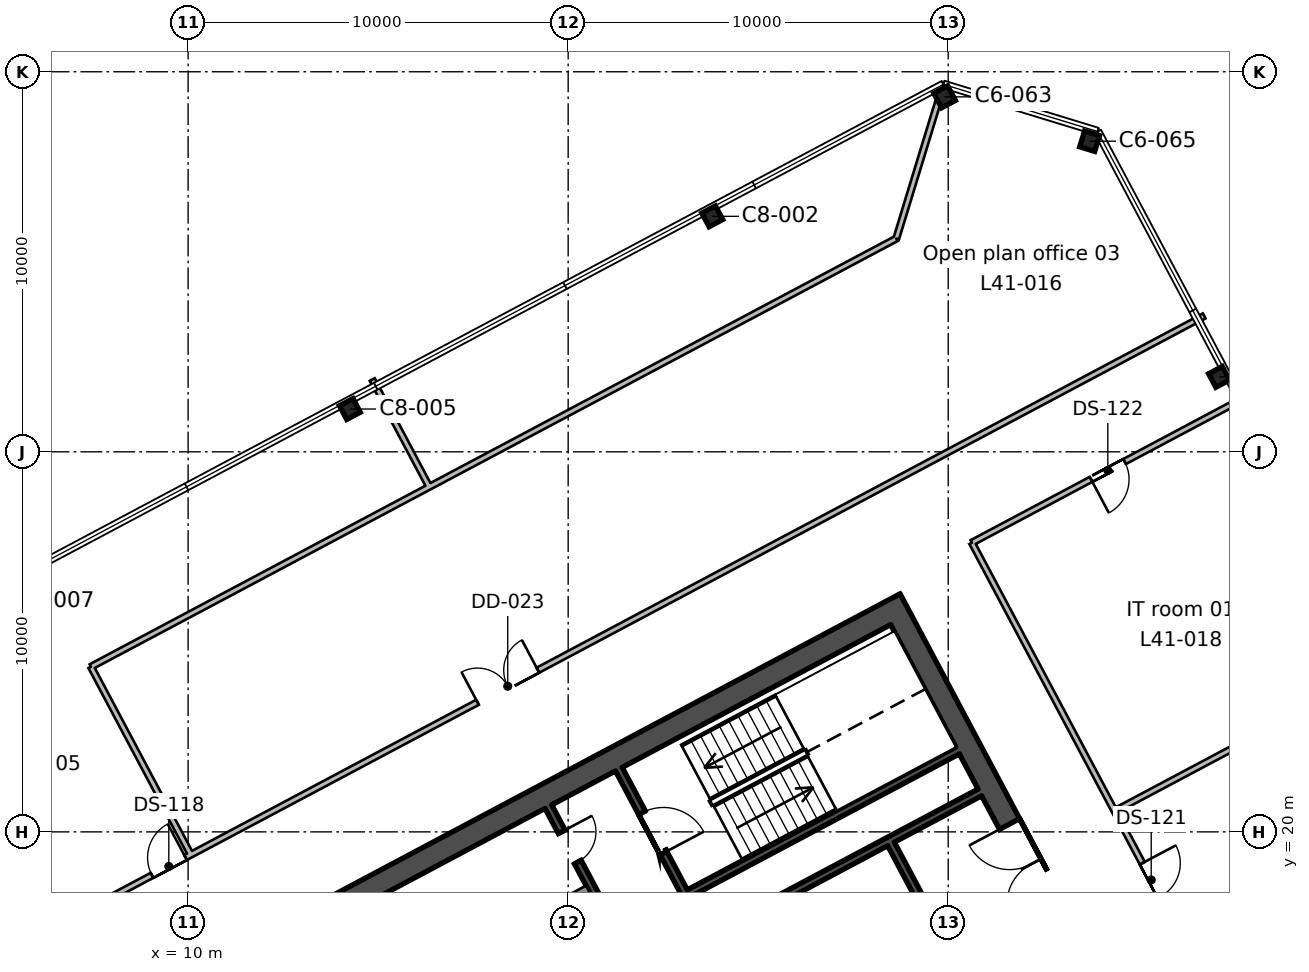
"""IFC4 building model, lengths in metres.
Left out: names, types, materials, properties, quantities, classifications, styles, units other than length and angle.
Written with IfcOpenShell. Run it as: python <this file> out.ifc"""

import sys

from ifc_helpers import new_model, si_unit, direction, frame, frame_2d, origin, origin_2d, place, context, subcontext, project, spatial, rectangle, i_section, extrude, element, fill, save


model = new_model("IFC4")
c1 = context("Model", 3, precision=1e-05, world=origin(), true_north=direction((0.0, 1.0)))
c2 = subcontext(c1, "Body", "Model", "MODEL_VIEW")
j1 = project(units=[si_unit("LENGTHUNIT", "METRE"), si_unit("PLANEANGLEUNIT", "RADIAN")], contexts=[c1])
p1 = place(None, origin())
s1 = spatial("IfcSite", under=j1, at=p1, CompositionType="ELEMENT")
p2 = place(p1, origin())
s2 = spatial("IfcBuilding", under=s1, at=p2, CompositionType="ELEMENT")
p3 = place(p2, frame((0.0, 0.0, 193.5)))
s3 = spatial("IfcBuildingStorey", under=s2, at=p3, CompositionType="ELEMENT", Elevation=193.5)
for number, where, z_axis, x_axis in (
    (1, (14.256, 31.126, 0.0), (0.0, 0.0, 1.0), (-0.883, -0.469, 0.0)),
    (2, (37.126, 31.972, 0.0), (0.0, 0.0, 1.0), (-0.469, 0.883, 0.0)),
    (3, (23.792, 36.196, 0.0), (0.0, 0.0, 1.0), (-0.883, -0.469, 0.0)),
):
    element("IfcColumn", number, at=place(p3, frame(where, z_axis=z_axis, x_axis=x_axis)), inside=s3, PredefinedType="COLUMN", context=c2, shape_type="SweptSolid", body=[
        extrude(i_section(OverallWidth=0.404, OverallDepth=0.406, WebThickness=0.027, FlangeThickness=0.044, FilletRadius=0.015, at=origin_2d()), origin(), (0.0, 0.0, 1.0), 3.9),
    ])
for number, where, z_axis, x_axis in (
    (4, (33.721, 38.173, 0.0), (0.0, 0.0, 1.0), (-0.956, 0.292, 0.0)),
    (5, (29.905, 39.34, 0.0), (0.0, 0.0, 1.0), (-0.883, -0.469, 0.0)),
):
    element("IfcColumn", number, at=place(p3, frame(where, z_axis=z_axis, x_axis=x_axis)), inside=s3, PredefinedType="COLUMN", context=c2, shape_type="SweptSolid", body=[
        extrude(i_section(OverallWidth=0.412, OverallDepth=0.434, WebThickness=0.036, FlangeThickness=0.057, FilletRadius=0.015, at=origin_2d()), origin(), (0.0, 0.0, 1.0), 3.9),
    ])
p4 = place(p3, frame((37.576, 8.994, 0.0), z_axis=(0.0, 0.0, 1.0), x_axis=(-0.469478769487, 0.88294376095, 0.0)))
e6 = element("IfcWall", 6, at=p4, inside=s3, PredefinedType="SHEAR", context=c2, shape_type="SweptSolid", body=[
    extrude(rectangle(XDim=19.4, YDim=0.6, at=frame_2d((9.7, 0.0))), origin(), (0.0, 0.0, 1.0), 3.9),
])
p5 = place(p4, frame((10.3, 0.0, 0.0)))
e7 = element("IfcOpeningElement", 7, at=p5, cuts=e6, PredefinedType="OPENING", context=c2, shape_type="SweptSolid", body=[
    extrude(rectangle(XDim=2.4, YDim=2.4, at=frame_2d((1.2, 1.2))), frame((0.0, 0.31, 0.0), z_axis=(0.0, -1.0, 0.0), x_axis=(1.0, 0.0, 0.0)), (0.0, 0.0, 1.0), 0.62),
])
p6 = place(p3, frame((10.509, 16.234, 0.0), z_axis=(0.0, 0.0, 1.0), x_axis=(0.88295010195, 0.469466843842, 0.0)))
e8 = element("IfcWall", 8, at=p6, inside=s3, PredefinedType="SHEAR", context=c2, shape_type="SweptSolid", body=[
    extrude(rectangle(XDim=20.2, YDim=0.6, at=frame_2d((10.1, 0.0))), origin(), (0.0, 0.0, 1.0), 3.9),
])
p7 = place(p3, frame((22.906, 14.218, 0.0), z_axis=(0.0, 0.0, 1.0), x_axis=(-0.469480409012, 0.88294288918, 0.0)))
e9 = element("IfcWall", 9, at=p7, inside=s3, PredefinedType="SHEAR", context=c2, shape_type="SweptSolid", body=[
    extrude(rectangle(XDim=7.3, YDim=0.2, at=frame_2d((3.65, 0.0))), origin(), (0.0, 0.0, 1.0), 3.9),
])
p8 = place(p7, frame((3.15, 0.0, 0.0)))
e10 = element("IfcOpeningElement", 10, at=p8, cuts=e9, PredefinedType="OPENING", context=c2, shape_type="SweptSolid", body=[
    extrude(rectangle(XDim=0.9, YDim=2.1, at=frame_2d((0.45, 1.05))), frame((0.0, 0.11, 0.0), z_axis=(0.0, -1.0, 0.0), x_axis=(1.0, 0.0, 0.0)), (0.0, 0.0, 1.0), 0.22),
])
p9 = place(p7, frame((5.65, 0.0, 0.0)))
e11 = element("IfcOpeningElement", 11, at=p9, cuts=e9, PredefinedType="OPENING", context=c2, shape_type="SweptSolid", body=[
    extrude(rectangle(XDim=0.9, YDim=2.1, at=frame_2d((0.45, 1.05))), frame((0.0, 0.11, 0.0), z_axis=(0.0, -1.0, 0.0), x_axis=(1.0, 0.0, 0.0)), (0.0, 0.0, 1.0), 0.22),
])
p10 = place(p3, frame((24.76, 15.204, 0.0), z_axis=(0.0, 0.0, 1.0), x_axis=(-0.469494272526, 0.882935517501, 0.0)))
e12 = element("IfcWall", 12, at=p10, inside=s3, PredefinedType="SHEAR", context=c2, shape_type="SweptSolid", body=[
    extrude(rectangle(XDim=7.3, YDim=0.2, at=frame_2d((3.65, 0.0))), origin(), (0.0, 0.0, 1.0), 3.9),
])
p11 = place(p10, frame((4.8, 0.0, 0.0)))
e13 = element("IfcOpeningElement", 13, at=p11, cuts=e12, PredefinedType="OPENING", context=c2, shape_type="SweptSolid", body=[
    extrude(rectangle(XDim=1.2, YDim=2.1, at=frame_2d((0.6, 1.05))), frame((0.0, 0.11, 0.0), z_axis=(0.0, -1.0, 0.0), x_axis=(1.0, 0.0, 0.0)), (0.0, 0.0, 1.0), 0.22),
])
p12 = place(p3, frame((29.528, 17.739, 0.0), z_axis=(0.0, 0.0, 1.0), x_axis=(-0.469401318492, 0.882984938828, 0.0)))
e14 = element("IfcWall", 14, at=p12, inside=s3, PredefinedType="SHEAR", context=c2, shape_type="SweptSolid", body=[
    extrude(rectangle(XDim=2.2, YDim=0.2, at=frame_2d((1.1, 0.0))), origin(), (0.0, 0.0, 1.0), 3.9),
])
p13 = place(p3, frame((23.769, 17.282, 0.0), z_axis=(0.0, 0.0, 1.0), x_axis=(0.882940221191, 0.469485426614, 0.0)))
e15 = element("IfcWall", 15, at=p13, inside=s3, PredefinedType="SHEAR", context=c2, shape_type="SweptSolid", body=[
    extrude(rectangle(XDim=8.0, YDim=0.2, at=frame_2d((4.0, 0.0))), origin(), (0.0, 0.0, 1.0), 3.9),
])
p14 = place(p3, frame((23.182, 18.385, 0.0), z_axis=(0.0, 0.0, 1.0), x_axis=(0.88295287151, 0.469461634952, 0.0)))
e16 = element("IfcWall", 16, at=p14, inside=s3, PredefinedType="SHEAR", context=c2, shape_type="SweptSolid", body=[
    extrude(rectangle(XDim=8.0, YDim=0.2, at=frame_2d((4.0, 0.0))), origin(), (0.0, 0.0, 1.0), 3.9),
])
p15 = place(p3, frame((15.926, 16.056, 0.0), z_axis=(0.0, 0.0, 1.0), x_axis=(0.882953967957, 0.469459572775, 0.0)))
e17 = element("IfcWall", 17, at=p15, inside=s3, PredefinedType="SOLIDWALL", context=c2, shape_type="SweptSolid", body=[
    extrude(rectangle(XDim=5.2, YDim=0.2, at=frame_2d((2.6, 0.0))), origin(), (0.0, 0.0, 1.0), 3.9),
])
p16 = place(p3, frame((0.0, 14.044, 0.0), z_axis=(0.0, 0.0, 1.0), x_axis=(0.882962129795, 0.469444221764, 0.0)))
e18 = element("IfcWall", 18, at=p16, inside=s3, PredefinedType="PARTITIONING", context=c2, shape_type="SweptSolid", body=[
    extrude(rectangle(XDim=41.607, YDim=0.15, at=frame_2d((20.803, 0.0))), origin(), (0.0, 0.0, 1.0), 3.54),
])
p17 = place(p16, frame((19.95, 0.0, 0.0)))
e19 = element("IfcOpeningElement", 19, at=p17, cuts=e18, PredefinedType="OPENING", context=c2, shape_type="SweptSolid", body=[
    extrude(rectangle(XDim=1.8, YDim=2.1, at=frame_2d((0.9, 1.05))), frame((0.0, 0.085, 0.0), z_axis=(0.0, -1.0, 0.0), x_axis=(1.0, 0.0, 0.0)), (0.0, 0.0, 1.0), 0.17),
])
p18 = place(p16, frame((10.25, 0.0, 0.0)))
e20 = element("IfcOpeningElement", 20, at=p18, cuts=e18, PredefinedType="OPENING", context=c2, shape_type="SweptSolid", body=[
    extrude(rectangle(XDim=1.0, YDim=2.1, at=frame_2d((0.5, 1.05))), frame((0.0, 0.085, 0.0), z_axis=(0.0, -1.0, 0.0), x_axis=(1.0, 0.0, 0.0)), (0.0, 0.0, 1.0), 0.17),
])
p19 = place(p3, frame((7.443, 24.344, 0.0), z_axis=(0.0, 0.0, 1.0), x_axis=(0.46934602066, -0.883014333344, 0.0)))
e21 = element("IfcWall", 21, at=p19, inside=s3, PredefinedType="PARTITIONING", context=c2, shape_type="SweptSolid", body=[
    extrude(rectangle(XDim=5.582, YDim=0.15, at=frame_2d((2.791, 0.0))), origin(), (0.0, 0.0, 1.0), 3.54),
])
p20 = place(p3, frame((7.443, 24.343, 0.0), z_axis=(0.0, 0.0, 1.0), x_axis=(0.882919378886, 0.469524621705, 0.0)))
e22 = element("IfcWall", 22, at=p20, inside=s3, PredefinedType="PARTITIONING", context=c2, shape_type="SweptSolid", body=[
    extrude(rectangle(XDim=10.082, YDim=0.15, at=frame_2d((5.041, 0.0))), origin(), (0.0, 0.0, 1.0), 3.54),
])
p21 = place(p3, frame((14.844, 31.903, 0.0), z_axis=(0.0, 0.0, 1.0), x_axis=(0.469051096607, -0.883171030306, 0.0)))
e23 = element("IfcWall", 23, at=p21, inside=s3, PredefinedType="PARTITIONING", context=c2, shape_type="SweptSolid", body=[
    extrude(rectangle(XDim=3.2, YDim=0.15, at=frame_2d((1.6, 0.0))), origin(), (0.0, 0.0, 1.0), 3.54),
])
p22 = place(p3, frame((16.345, 29.077, 0.0), z_axis=(0.0, 0.0, 1.0), x_axis=(0.882962129602, 0.469444222128, 0.0)))
e24 = element("IfcWall", 24, at=p22, inside=s3, PredefinedType="PARTITIONING", context=c2, shape_type="SweptSolid", body=[
    extrude(rectangle(XDim=13.917, YDim=0.15, at=frame_2d((6.958, 0.0))), origin(), (0.0, 0.0, 1.0), 3.54),
])
p23 = place(p3, frame((28.633, 35.61, 0.0), z_axis=(0.0, 0.0, 1.0), x_axis=(0.292294142097, 0.956328465798, 0.0)))
e25 = element("IfcWall", 25, at=p23, inside=s3, PredefinedType="PARTITIONING", context=c2, shape_type="SweptSolid", body=[
    extrude(rectangle(XDim=3.774, YDim=0.15, at=frame_2d((1.887, 0.0))), origin(), (0.0, 0.0, 1.0), 3.54),
])
p24 = place(p3, frame((37.864, 31.458, 0.0), z_axis=(0.0, 0.0, 1.0), x_axis=(-0.882947223068, -0.469472258261, 0.0)))
e26 = element("IfcWall", 26, at=p24, inside=s3, PredefinedType="PARTITIONING", context=c2, shape_type="SweptSolid", body=[
    extrude(rectangle(XDim=8.201, YDim=0.15, at=frame_2d((4.101, 0.0))), origin(), (0.0, 0.0, 1.0), 3.54),
])
p25 = place(p24, frame((3.65, 0.0, 0.0)))
e27 = element("IfcOpeningElement", 27, at=p25, cuts=e26, PredefinedType="OPENING", context=c2, shape_type="SweptSolid", body=[
    extrude(rectangle(XDim=1.0, YDim=2.1, at=frame_2d((0.5, 1.05))), frame((0.0, 0.085, 0.0), z_axis=(0.0, -1.0, 0.0), x_axis=(1.0, 0.0, 0.0)), (0.0, 0.0, 1.0), 0.17),
])
p26 = place(p3, frame((30.623, 27.608, 0.0), z_axis=(0.0, 0.0, 1.0), x_axis=(0.469489882812, -0.882937851685, 0.0)))
e28 = element("IfcWall", 28, at=p26, inside=s3, PredefinedType="PARTITIONING", context=c2, shape_type="SweptSolid", body=[
    extrude(rectangle(XDim=20.0, YDim=0.15, at=frame_2d((10.0, 0.0))), origin(), (0.0, 0.0, 1.0), 3.54),
])
p27 = place(p26, frame((9.55, 0.0, 0.0)))
e29 = element("IfcOpeningElement", 29, at=p27, cuts=e28, PredefinedType="OPENING", context=c2, shape_type="SweptSolid", body=[
    extrude(rectangle(XDim=1.0, YDim=2.1, at=frame_2d((0.5, 1.05))), frame((0.0, 0.085, 0.0), z_axis=(0.0, -1.0, 0.0), x_axis=(1.0, 0.0, 0.0)), (0.0, 0.0, 1.0), 0.17),
])
p28 = place(p3, frame((41.619, 24.395, 0.0), z_axis=(0.0, 0.0, 1.0), x_axis=(-0.882920973231, -0.4695216236, 0.0)))
e30 = element("IfcWall", 30, at=p28, inside=s3, PredefinedType="PARTITIONING", context=c2, shape_type="SweptSolid", body=[
    extrude(rectangle(XDim=8.2, YDim=0.15, at=frame_2d((4.1, 0.0))), origin(), (0.0, 0.0, 1.0), 3.54),
])
p29 = place(p5, origin())
e31 = element("IfcDoor", 31, at=p29, inside=s3, OperationType="DOUBLE_DOOR_SINGLE_SWING", PredefinedType="DOOR", context=c2, shape_type="SweptSolid", body=[
    extrude(rectangle(XDim=2.4, YDim=2.4, at=frame_2d((1.2, 1.2))), frame((0.0, 0.025, 0.0), z_axis=(0.0, -1.0, 0.0), x_axis=(1.0, 0.0, 0.0)), (0.0, 0.0, 1.0), 0.05),
])
fill(e7, e31)
p30 = place(p11, frame((1.2, 0.0, 0.0), z_axis=(0.0, 0.0, 1.0), x_axis=(-1.0, 0.0, 0.0)))
e32 = element("IfcDoor", 32, at=p30, inside=s3, OperationType="SINGLE_SWING_RIGHT", PredefinedType="DOOR", context=c2, shape_type="SweptSolid", body=[
    extrude(rectangle(XDim=1.2, YDim=2.1, at=frame_2d((0.6, 1.05))), frame((0.0, 0.025, 0.0), z_axis=(0.0, -1.0, 0.0), x_axis=(1.0, 0.0, 0.0)), (0.0, 0.0, 1.0), 0.05),
])
fill(e13, e32)
p31 = place(p9, frame((0.9, 0.0, 0.0), z_axis=(0.0, 0.0, 1.0), x_axis=(-1.0, 0.0, 0.0)))
e33 = element("IfcDoor", 33, at=p31, inside=s3, OperationType="SINGLE_SWING_LEFT", PredefinedType="DOOR", context=c2, shape_type="SweptSolid", body=[
    extrude(rectangle(XDim=0.9, YDim=2.1, at=frame_2d((0.45, 1.05))), frame((0.0, 0.025, 0.0), z_axis=(0.0, -1.0, 0.0), x_axis=(1.0, 0.0, 0.0)), (0.0, 0.0, 1.0), 0.05),
])
fill(e11, e33)
p32 = place(p17, origin())
e34 = element("IfcDoor", 34, at=p32, inside=s3, OperationType="DOUBLE_DOOR_SINGLE_SWING", PredefinedType="DOOR", context=c2, shape_type="SweptSolid", body=[
    extrude(rectangle(XDim=1.8, YDim=2.1, at=frame_2d((0.9, 1.05))), frame((0.0, 0.025, 0.0), z_axis=(0.0, -1.0, 0.0), x_axis=(1.0, 0.0, 0.0)), (0.0, 0.0, 1.0), 0.05),
])
fill(e19, e34)
p33 = place(p18, origin())
e35 = element("IfcDoor", 35, at=p33, inside=s3, OperationType="SINGLE_SWING_RIGHT", PredefinedType="DOOR", context=c2, shape_type="SweptSolid", body=[
    extrude(rectangle(XDim=1.0, YDim=2.1, at=frame_2d((0.5, 1.05))), frame((0.0, 0.025, 0.0), z_axis=(0.0, -1.0, 0.0), x_axis=(1.0, 0.0, 0.0)), (0.0, 0.0, 1.0), 0.05),
])
fill(e20, e35)
p34 = place(p27, origin())
e36 = element("IfcDoor", 36, at=p34, inside=s3, OperationType="SINGLE_SWING_LEFT", PredefinedType="DOOR", context=c2, shape_type="SweptSolid", body=[
    extrude(rectangle(XDim=1.0, YDim=2.1, at=frame_2d((0.5, 1.05))), frame((0.0, 0.025, 0.0), z_axis=(0.0, -1.0, 0.0), x_axis=(1.0, 0.0, 0.0)), (0.0, 0.0, 1.0), 0.05),
])
fill(e29, e36)
p35 = place(p25, origin())
e37 = element("IfcDoor", 37, at=p35, inside=s3, OperationType="SINGLE_SWING_RIGHT", PredefinedType="DOOR", context=c2, shape_type="SweptSolid", body=[
    extrude(rectangle(XDim=1.0, YDim=2.1, at=frame_2d((0.5, 1.05))), frame((0.0, 0.025, 0.0), z_axis=(0.0, -1.0, 0.0), x_axis=(1.0, 0.0, 0.0)), (0.0, 0.0, 1.0), 0.05),
])
fill(e27, e37)
save(model, sys.argv[1])
